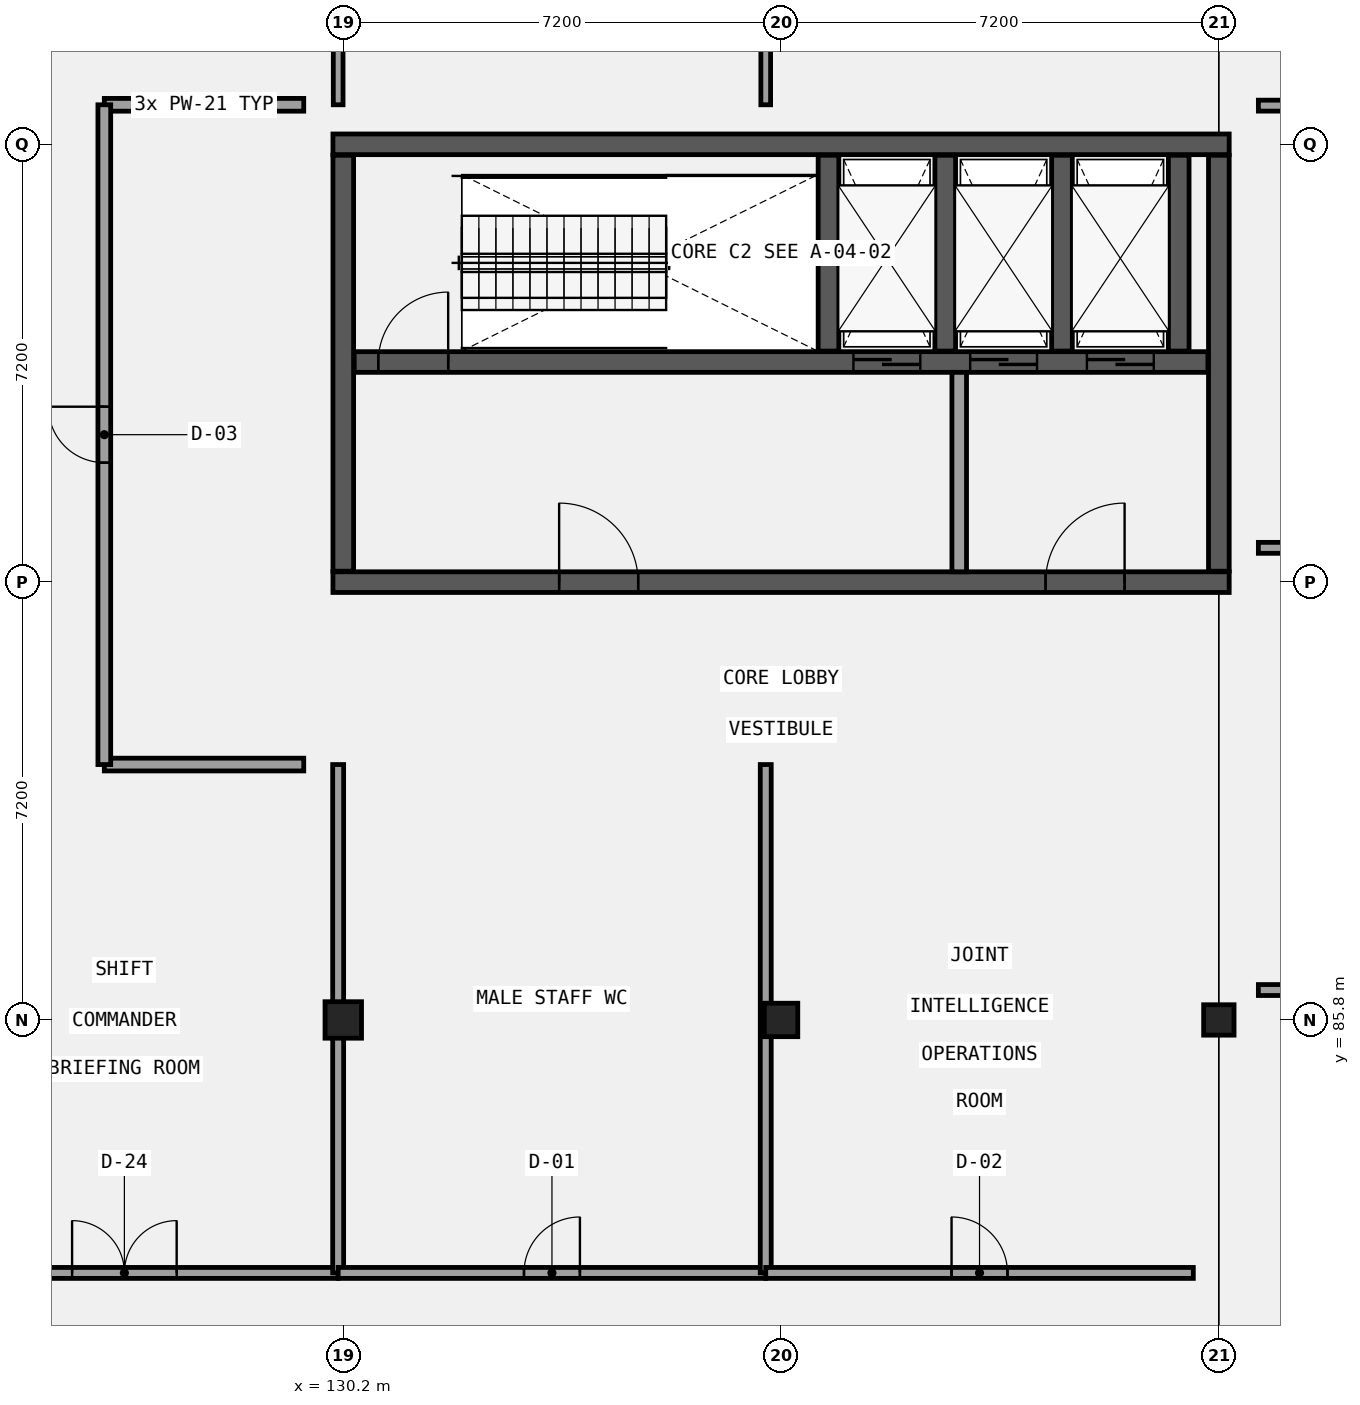
"""IFC4 building model, lengths in metres.
Left out: names, types, materials, properties, quantities, classifications, styles, units other than length and angle.
Written with IfcOpenShell. Run it as: python <this file> out.ifc"""

import sys

from ifc_helpers import new_model, si_unit, direction, frame, frame_2d, origin, origin_2d, place, context, subcontext, project, spatial, rectangle, extrude, element, fill, save


model = new_model("IFC4")
c1 = context("Model", 3, precision=1e-05, world=origin(), true_north=direction((0.0, 1.0)))
c2 = subcontext(c1, "Body", "Model", "MODEL_VIEW")
j1 = project(units=[si_unit("LENGTHUNIT", "METRE"), si_unit("PLANEANGLEUNIT", "RADIAN")], contexts=[c1])
p1 = place(None, origin())
s1 = spatial("IfcSite", under=j1, at=p1, CompositionType="ELEMENT")
p2 = place(p1, origin())
s2 = spatial("IfcBuilding", under=s1, at=p2, CompositionType="ELEMENT")
p3 = place(p2, frame((0.0, 0.0, 26.4)))
s3 = spatial("IfcBuildingStorey", under=s2, at=p3, CompositionType="ELEMENT", Elevation=26.4)
p4 = place(p3, frame((130.03, 100.2, 0.0), z_axis=(0.0, 0.0, 1.0), x_axis=(1.0, 0.0, 0.0)))
e1 = element("IfcWall", 1, at=p4, inside=s3, PredefinedType="SHEAR", context=c2, shape_type="SweptSolid", body=[
    extrude(rectangle(XDim=14.74, YDim=0.34, at=frame_2d((7.37, 0.0))), origin(), (0.0, 0.0, 1.0), 4.5),
])
p5 = place(p3, frame((130.03, 93.0, 0.0), z_axis=(0.0, 0.0, 1.0), x_axis=(1.0, 0.0, 0.0)))
e2 = element("IfcWall", 2, at=p5, inside=s3, PredefinedType="SHEAR", context=c2, shape_type="SweptSolid", body=[
    extrude(rectangle(XDim=14.74, YDim=0.34, at=frame_2d((7.37, 0.0))), origin(), (0.0, 0.0, 1.0), 4.5),
])
p6 = place(p5, frame((3.72, 0.0, 0.0)))
e3 = element("IfcOpeningElement", 3, at=p6, cuts=e2, PredefinedType="OPENING", context=c2, shape_type="SweptSolid", body=[
    extrude(rectangle(XDim=1.3, YDim=2.2, at=frame_2d((0.65, 1.1))), frame((0.0, 0.18, 0.0), z_axis=(0.0, -1.0, 0.0), x_axis=(1.0, 0.0, 0.0)), (0.0, 0.0, 1.0), 0.36),
])
p7 = place(p5, frame((11.72, 0.0, 0.0)))
e4 = element("IfcOpeningElement", 4, at=p7, cuts=e2, PredefinedType="OPENING", context=c2, shape_type="SweptSolid", body=[
    extrude(rectangle(XDim=1.3, YDim=2.2, at=frame_2d((0.65, 1.1))), frame((0.0, 0.18, 0.0), z_axis=(0.0, -1.0, 0.0), x_axis=(1.0, 0.0, 0.0)), (0.0, 0.0, 1.0), 0.36),
])
for number, where, z_axis, x_axis in (
    (5, (130.2, 93.18, 0.0), (0.0, 0.0, 1.0), (0.0, 1.0, 0.0)),
    (6, (144.6, 93.18, 0.0), (0.0, 0.0, 1.0), (0.0, 1.0, 0.0)),
):
    element("IfcWall", number, at=place(p3, frame(where, z_axis=z_axis, x_axis=x_axis)), inside=s3, PredefinedType="SHEAR", context=c2, shape_type="SweptSolid", body=[
        extrude(rectangle(XDim=6.84, YDim=0.34, at=frame_2d((3.42, 0.0))), origin(), (0.0, 0.0, 1.0), 4.5),
    ])
p8 = place(p3, frame((130.38, 96.62, 0.0), z_axis=(0.0, 0.0, 1.0), x_axis=(1.0, 0.0, 0.0)))
e7 = element("IfcWall", 7, at=p8, inside=s3, PredefinedType="SHEAR", context=c2, shape_type="SweptSolid", body=[
    extrude(rectangle(XDim=14.04, YDim=0.34, at=frame_2d((7.02, 0.0))), origin(), (0.0, 0.0, 1.0), 4.5),
])
p9 = place(p8, frame((8.21, 0.0, 0.0)))
e8 = element("IfcOpeningElement", 8, at=p9, cuts=e7, PredefinedType="OPENING", context=c2, shape_type="SweptSolid", body=[
    extrude(rectangle(XDim=1.1, YDim=2.15, at=frame_2d((0.55, 1.075))), frame((0.0, 0.18, 0.0), z_axis=(0.0, -1.0, 0.0), x_axis=(1.0, 0.0, 0.0)), (0.0, 0.0, 1.0), 0.36),
])
p10 = place(p8, frame((10.13, 0.0, 0.0)))
e9 = element("IfcOpeningElement", 9, at=p10, cuts=e7, PredefinedType="OPENING", context=c2, shape_type="SweptSolid", body=[
    extrude(rectangle(XDim=1.1, YDim=2.15, at=frame_2d((0.55, 1.075))), frame((0.0, 0.18, 0.0), z_axis=(0.0, -1.0, 0.0), x_axis=(1.0, 0.0, 0.0)), (0.0, 0.0, 1.0), 0.36),
])
p11 = place(p8, frame((12.05, 0.0, 0.0)))
e10 = element("IfcOpeningElement", 10, at=p11, cuts=e7, PredefinedType="OPENING", context=c2, shape_type="SweptSolid", body=[
    extrude(rectangle(XDim=1.1, YDim=2.15, at=frame_2d((0.55, 1.075))), frame((0.0, 0.18, 0.0), z_axis=(0.0, -1.0, 0.0), x_axis=(1.0, 0.0, 0.0)), (0.0, 0.0, 1.0), 0.36),
])
p12 = place(p8, frame((0.395, 0.0, 0.0)))
e11 = element("IfcOpeningElement", 11, at=p12, cuts=e7, PredefinedType="OPENING", context=c2, shape_type="SweptSolid", body=[
    extrude(rectangle(XDim=1.15, YDim=2.15, at=frame_2d((0.575, 1.075))), frame((0.0, 0.18, 0.0), z_axis=(0.0, -1.0, 0.0), x_axis=(1.0, 0.0, 0.0)), (0.0, 0.0, 1.0), 0.36),
])
for number, where, z_axis, x_axis in (
    (12, (138.18, 96.8, 0.0), (0.0, 0.0, 1.0), (0.0, 1.0, 0.0)),
    (13, (140.1, 96.8, 0.0), (0.0, 0.0, 1.0), (0.0, 1.0, 0.0)),
    (14, (142.02, 96.8, 0.0), (0.0, 0.0, 1.0), (0.0, 1.0, 0.0)),
    (15, (143.94, 96.8, 0.0), (0.0, 0.0, 1.0), (0.0, 1.0, 0.0)),
):
    element("IfcWall", number, at=place(p3, frame(where, z_axis=z_axis, x_axis=x_axis)), inside=s3, PredefinedType="SHEAR", context=c2, shape_type="SweptSolid", body=[
        extrude(rectangle(XDim=3.22, YDim=0.34, at=frame_2d((1.61, 0.0))), origin(), (0.0, 0.0, 1.0), 4.5),
    ])
p13 = place(p3, frame((130.2, 85.8, 0.0), z_axis=(0.0, 0.0, 1.0), x_axis=(1.0, 0.0, 0.0)))
e16 = element("IfcColumn", 16, at=p13, inside=s3, PredefinedType="COLUMN", context=c2, shape_type="SweptSolid", body=[
    extrude(rectangle(XDim=0.6, YDim=0.6, at=origin_2d()), origin(), (0.0, 0.0, 1.0), 4.5),
])
p14 = place(p3, frame((137.4, 85.8, 0.0), z_axis=(0.0, 0.0, 1.0), x_axis=(1.0, 0.0, 0.0)))
e17 = element("IfcColumn", 17, at=p14, inside=s3, PredefinedType="COLUMN", context=c2, shape_type="SweptSolid", body=[
    extrude(rectangle(XDim=0.55, YDim=0.55, at=origin_2d()), origin(), (0.0, 0.0, 1.0), 4.5),
])
p15 = place(p3, frame((144.6, 85.8, 0.0), z_axis=(0.0, 0.0, 1.0), x_axis=(1.0, 0.0, 0.0)))
e18 = element("IfcColumn", 18, at=p15, inside=s3, PredefinedType="COLUMN", context=c2, shape_type="SweptSolid", body=[
    extrude(rectangle(XDim=0.5, YDim=0.5, at=origin_2d()), origin(), (0.0, 0.0, 1.0), 4.5),
])
p16 = place(p3, frame((140.33, 93.17, 0.0), z_axis=(0.0, 0.0, 1.0), x_axis=(0.0, 1.0, 0.0)))
e19 = element("IfcWall", 19, at=p16, inside=s3, PredefinedType="SOLIDWALL", context=c2, shape_type="SweptSolid", body=[
    extrude(rectangle(XDim=3.28, YDim=0.24, at=frame_2d((1.64, 0.0))), origin(), (0.0, 0.0, 1.0), 4.19),
])
for number, where, z_axis, x_axis in (
    (20, (130.116, 100.85, 0.0), (0.0, 0.0, 1.0), (0.0, 1.0, 0.0)),
    (21, (137.148, 100.85, 0.0), (0.0, 0.0, 1.0), (0.0, 1.0, 0.0)),
):
    element("IfcWall", number, at=place(p3, frame(where, z_axis=z_axis, x_axis=x_axis)), inside=s3, PredefinedType="PARTITIONING", context=c2, shape_type="SweptSolid", body=[
        extrude(rectangle(XDim=7.29, YDim=0.16, at=frame_2d((3.645, 0.0))), origin(), (0.0, 0.0, 1.0), 3.22),
    ])
p17 = place(p3, frame((123.084, 81.64, 0.0), z_axis=(0.0, 0.0, 1.0), x_axis=(1.0, 0.0, 0.0)))
e22 = element("IfcWall", 22, at=p17, inside=s3, PredefinedType="PARTITIONING", context=c2, shape_type="SweptSolid", body=[
    extrude(rectangle(XDim=7.032, YDim=0.18, at=frame_2d((3.516, 0.0))), origin(), (0.0, 0.0, 1.0), 4.22),
])
p18 = place(p17, frame((2.656, 0.0, 0.0)))
e23 = element("IfcOpeningElement", 23, at=p18, cuts=e22, PredefinedType="OPENING", context=c2, shape_type="SweptSolid", body=[
    extrude(rectangle(XDim=1.72, YDim=2.35, at=frame_2d((0.86, 1.175))), frame((0.0, 0.1, 0.0), z_axis=(0.0, -1.0, 0.0), x_axis=(1.0, 0.0, 0.0)), (0.0, 0.0, 1.0), 0.2),
])
p19 = place(p3, frame((130.116, 81.64, 0.0), z_axis=(0.0, 0.0, 1.0), x_axis=(0.0, 1.0, 0.0)))
e24 = element("IfcWall", 24, at=p19, inside=s3, PredefinedType="PARTITIONING", context=c2, shape_type="SweptSolid", body=[
    extrude(rectangle(XDim=8.36, YDim=0.18, at=frame_2d((4.18, 0.0))), origin(), (0.0, 0.0, 1.0), 3.42),
])
p20 = place(p3, frame((130.116, 81.64, 0.0), z_axis=(0.0, 0.0, 1.0), x_axis=(1.0, 0.0, 0.0)))
e25 = element("IfcWall", 25, at=p20, inside=s3, PredefinedType="PARTITIONING", context=c2, shape_type="SweptSolid", body=[
    extrude(rectangle(XDim=7.032, YDim=0.18, at=frame_2d((3.516, 0.0))), origin(), (0.0, 0.0, 1.0), 4.22),
])
p21 = place(p20, frame((3.056, 0.0, 0.0)))
e26 = element("IfcOpeningElement", 26, at=p21, cuts=e25, PredefinedType="OPENING", context=c2, shape_type="SweptSolid", body=[
    extrude(rectangle(XDim=0.92, YDim=2.1, at=frame_2d((0.46, 1.05))), frame((0.0, 0.1, 0.0), z_axis=(0.0, -1.0, 0.0), x_axis=(1.0, 0.0, 0.0)), (0.0, 0.0, 1.0), 0.2),
])
p22 = place(p3, frame((137.148, 81.64, 0.0), z_axis=(0.0, 0.0, 1.0), x_axis=(0.0, 1.0, 0.0)))
e27 = element("IfcWall", 27, at=p22, inside=s3, PredefinedType="PARTITIONING", context=c2, shape_type="SweptSolid", body=[
    extrude(rectangle(XDim=8.36, YDim=0.18, at=frame_2d((4.18, 0.0))), origin(), (0.0, 0.0, 1.0), 3.37),
])
p23 = place(p3, frame((137.148, 81.64, 0.0), z_axis=(0.0, 0.0, 1.0), x_axis=(1.0, 0.0, 0.0)))
e28 = element("IfcWall", 28, at=p23, inside=s3, PredefinedType="PARTITIONING", context=c2, shape_type="SweptSolid", body=[
    extrude(rectangle(XDim=7.032, YDim=0.18, at=frame_2d((3.516, 0.0))), origin(), (0.0, 0.0, 1.0), 4.22),
])
p24 = place(p23, frame((3.056, 0.0, 0.0)))
e29 = element("IfcOpeningElement", 29, at=p24, cuts=e28, PredefinedType="OPENING", context=c2, shape_type="SweptSolid", body=[
    extrude(rectangle(XDim=0.92, YDim=2.22, at=frame_2d((0.46, 1.11))), frame((0.0, 0.1, 0.0), z_axis=(0.0, -1.0, 0.0), x_axis=(1.0, 0.0, 0.0)), (0.0, 0.0, 1.0), 0.2),
])
for number, where, z_axis, x_axis in (
    (30, (126.27, 90.0, 0.0), (0.0, 0.0, 1.0), (1.0, 0.0, 0.0)),
    (31, (126.27, 100.85, 0.0), (0.0, 0.0, 1.0), (1.0, 0.0, 0.0)),
):
    element("IfcWall", number, at=place(p3, frame(where, z_axis=z_axis, x_axis=x_axis)), inside=s3, PredefinedType="PARTITIONING", context=c2, shape_type="SweptSolid", body=[
        extrude(rectangle(XDim=3.28, YDim=0.21, at=frame_2d((1.64, 0.0))), origin(), (0.0, 0.0, 1.0), 4.22),
    ])
p25 = place(p3, frame((126.27, 90.0, 0.0), z_axis=(0.0, 0.0, 1.0), x_axis=(0.0, 1.0, 0.0)))
e32 = element("IfcWall", 32, at=p25, inside=s3, PredefinedType="PARTITIONING", context=c2, shape_type="SweptSolid", body=[
    extrude(rectangle(XDim=10.85, YDim=0.21, at=frame_2d((5.425, 0.0))), origin(), (0.0, 0.0, 1.0), 4.22),
])
p26 = place(p25, frame((4.965, 0.0, 0.0)))
e33 = element("IfcOpeningElement", 33, at=p26, cuts=e32, PredefinedType="OPENING", context=c2, shape_type="SweptSolid", body=[
    extrude(rectangle(XDim=0.92, YDim=2.35, at=frame_2d((0.46, 1.175))), frame((0.0, 0.115, 0.0), z_axis=(0.0, -1.0, 0.0), x_axis=(1.0, 0.0, 0.0)), (0.0, 0.0, 1.0), 0.23),
])
for number, where, z_axis, x_axis in (
    (34, (145.25, 86.292, 0.0), (0.0, 0.0, 1.0), (1.0, 0.0, 0.0)),
    (35, (145.25, 93.564, 0.0), (0.0, 0.0, 1.0), (1.0, 0.0, 0.0)),
    (36, (145.25, 100.836, 0.0), (0.0, 0.0, 1.0), (1.0, 0.0, 0.0)),
):
    element("IfcWall", number, at=place(p3, frame(where, z_axis=z_axis, x_axis=x_axis)), inside=s3, PredefinedType="PARTITIONING", context=c2, shape_type="SweptSolid", body=[
        extrude(rectangle(XDim=10.545, YDim=0.18, at=frame_2d((5.272, 0.0))), origin(), (0.0, 0.0, 1.0), 4.22),
    ])
p27 = place(p9, frame((1.1, 0.0, 0.0), z_axis=(0.0, 0.0, 1.0), x_axis=(-1.0, 0.0, 0.0)))
e37 = element("IfcDoor", 37, at=p27, inside=s3, OperationType="DOUBLE_DOOR_SLIDING", PredefinedType="DOOR", context=c2, shape_type="SweptSolid", body=[
    extrude(rectangle(XDim=1.1, YDim=2.15, at=frame_2d((0.55, 1.075))), frame((0.0, 0.025, 0.0), z_axis=(0.0, -1.0, 0.0), x_axis=(1.0, 0.0, 0.0)), (0.0, 0.0, 1.0), 0.05),
])
fill(e8, e37)
p28 = place(p10, frame((1.1, 0.0, 0.0), z_axis=(0.0, 0.0, 1.0), x_axis=(-1.0, 0.0, 0.0)))
e38 = element("IfcDoor", 38, at=p28, inside=s3, OperationType="DOUBLE_DOOR_SLIDING", PredefinedType="DOOR", context=c2, shape_type="SweptSolid", body=[
    extrude(rectangle(XDim=1.1, YDim=2.15, at=frame_2d((0.55, 1.075))), frame((0.0, 0.025, 0.0), z_axis=(0.0, -1.0, 0.0), x_axis=(1.0, 0.0, 0.0)), (0.0, 0.0, 1.0), 0.05),
])
fill(e9, e38)
p29 = place(p11, frame((1.1, 0.0, 0.0), z_axis=(0.0, 0.0, 1.0), x_axis=(-1.0, 0.0, 0.0)))
e39 = element("IfcDoor", 39, at=p29, inside=s3, OperationType="DOUBLE_DOOR_SLIDING", PredefinedType="DOOR", context=c2, shape_type="SweptSolid", body=[
    extrude(rectangle(XDim=1.1, YDim=2.15, at=frame_2d((0.55, 1.075))), frame((0.0, 0.025, 0.0), z_axis=(0.0, -1.0, 0.0), x_axis=(1.0, 0.0, 0.0)), (0.0, 0.0, 1.0), 0.05),
])
fill(e10, e39)
p30 = place(p12, origin())
e40 = element("IfcDoor", 40, at=p30, inside=s3, OperationType="SINGLE_SWING_RIGHT", PredefinedType="DOOR", context=c2, shape_type="SweptSolid", body=[
    extrude(rectangle(XDim=1.15, YDim=2.15, at=frame_2d((0.575, 1.075))), frame((0.0, 0.025, 0.0), z_axis=(0.0, -1.0, 0.0), x_axis=(1.0, 0.0, 0.0)), (0.0, 0.0, 1.0), 0.05),
])
fill(e11, e40)
p31 = place(p6, frame((1.3, 0.0, 0.0), z_axis=(0.0, 0.0, 1.0), x_axis=(-1.0, 0.0, 0.0)))
e41 = element("IfcDoor", 41, at=p31, inside=s3, OperationType="SINGLE_SWING_LEFT", PredefinedType="DOOR", context=c2, shape_type="SweptSolid", body=[
    extrude(rectangle(XDim=1.3, YDim=2.2, at=frame_2d((0.65, 1.1))), frame((0.0, 0.025, 0.0), z_axis=(0.0, -1.0, 0.0), x_axis=(1.0, 0.0, 0.0)), (0.0, 0.0, 1.0), 0.05),
])
fill(e3, e41)
p32 = place(p7, frame((1.3, 0.0, 0.0), z_axis=(0.0, 0.0, 1.0), x_axis=(-1.0, 0.0, 0.0)))
e42 = element("IfcDoor", 42, at=p32, inside=s3, OperationType="SINGLE_SWING_RIGHT", PredefinedType="DOOR", context=c2, shape_type="SweptSolid", body=[
    extrude(rectangle(XDim=1.3, YDim=2.2, at=frame_2d((0.65, 1.1))), frame((0.0, 0.025, 0.0), z_axis=(0.0, -1.0, 0.0), x_axis=(1.0, 0.0, 0.0)), (0.0, 0.0, 1.0), 0.05),
])
fill(e4, e42)
p33 = place(p18, origin())
e43 = element("IfcDoor", 43, at=p33, inside=s3, OperationType="DOUBLE_DOOR_SINGLE_SWING", PredefinedType="DOOR", context=c2, shape_type="SweptSolid", body=[
    extrude(rectangle(XDim=1.72, YDim=2.35, at=frame_2d((0.86, 1.175))), frame((0.0, 0.025, 0.0), z_axis=(0.0, -1.0, 0.0), x_axis=(1.0, 0.0, 0.0)), (0.0, 0.0, 1.0), 0.05),
])
fill(e23, e43)
p34 = place(p21, origin())
e44 = element("IfcDoor", 44, at=p34, inside=s3, OperationType="SINGLE_SWING_RIGHT", PredefinedType="DOOR", context=c2, shape_type="SweptSolid", body=[
    extrude(rectangle(XDim=0.92, YDim=2.1, at=frame_2d((0.46, 1.05))), frame((0.0, 0.025, 0.0), z_axis=(0.0, -1.0, 0.0), x_axis=(1.0, 0.0, 0.0)), (0.0, 0.0, 1.0), 0.05),
])
fill(e26, e44)
p35 = place(p24, origin())
e45 = element("IfcDoor", 45, at=p35, inside=s3, OperationType="SINGLE_SWING_LEFT", PredefinedType="DOOR", context=c2, shape_type="SweptSolid", body=[
    extrude(rectangle(XDim=0.92, YDim=2.22, at=frame_2d((0.46, 1.11))), frame((0.0, 0.025, 0.0), z_axis=(0.0, -1.0, 0.0), x_axis=(1.0, 0.0, 0.0)), (0.0, 0.0, 1.0), 0.05),
])
fill(e29, e45)
p36 = place(p26, origin())
e46 = element("IfcDoor", 46, at=p36, inside=s3, OperationType="SINGLE_SWING_RIGHT", PredefinedType="DOOR", context=c2, shape_type="SweptSolid", body=[
    extrude(rectangle(XDim=0.92, YDim=2.35, at=frame_2d((0.46, 1.175))), frame((0.0, 0.025, 0.0), z_axis=(0.0, -1.0, 0.0), x_axis=(1.0, 0.0, 0.0)), (0.0, 0.0, 1.0), 0.05),
])
fill(e33, e46)
save(model, sys.argv[1])
